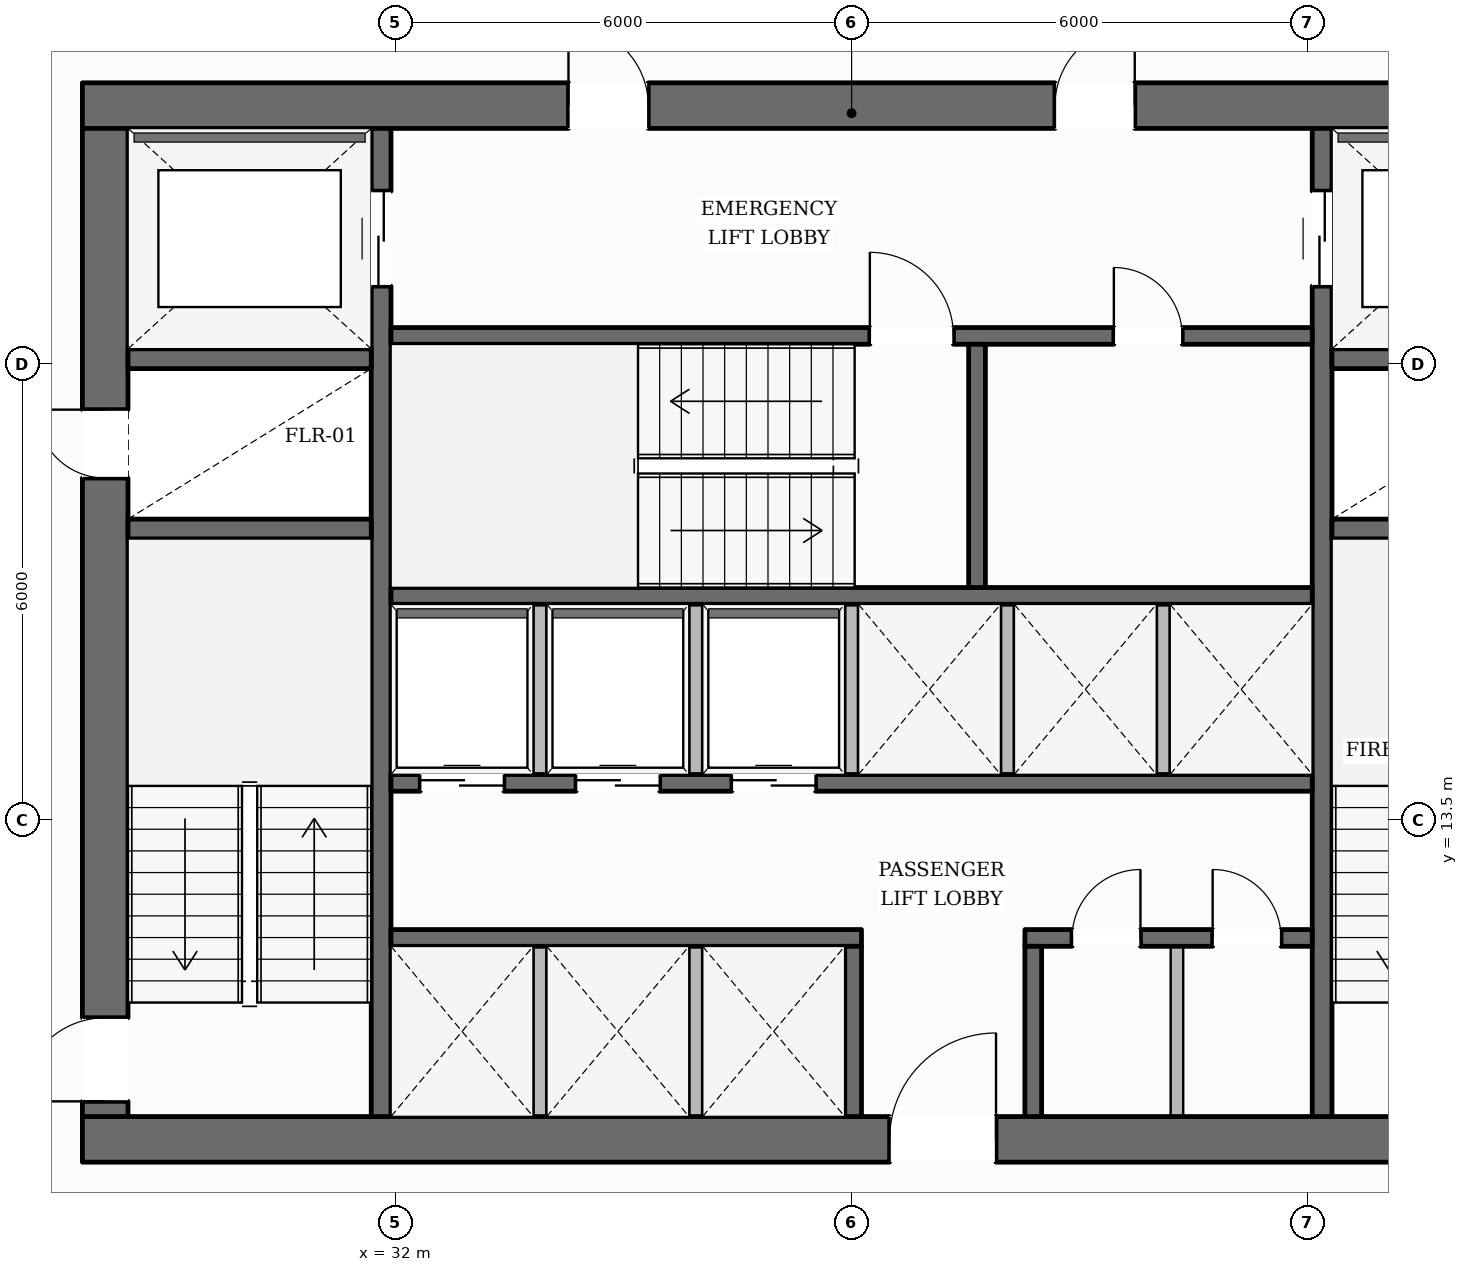
"""IFC4 building model, lengths in metres.
Left out: names, types, materials, properties, quantities, classifications, styles, units other than length and angle.
Written with IfcOpenShell. Run it as: python <this file> out.ifc"""

import sys

from ifc_helpers import new_model, si_unit, direction, frame, frame_2d, origin, place, context, subcontext, project, spatial, rectangle, extrude, element, fill, save


model = new_model("IFC4")
c1 = context("Model", 3, precision=1e-05, world=origin(), true_north=direction((0.0, 1.0)))
c2 = subcontext(c1, "Body", "Model", "MODEL_VIEW")
j1 = project(units=[si_unit("LENGTHUNIT", "METRE"), si_unit("PLANEANGLEUNIT", "RADIAN")], contexts=[c1])
p1 = place(None, origin())
s1 = spatial("IfcSite", under=j1, at=p1, CompositionType="ELEMENT")
p2 = place(p1, origin())
s2 = spatial("IfcBuilding", under=s1, at=p2, CompositionType="ELEMENT")
p3 = place(p2, frame((0.0, 0.0, 59.9)))
s3 = spatial("IfcBuildingStorey", under=s2, at=p3, CompositionType="ELEMENT", Elevation=59.9)
p4 = place(p3, frame((27.88, 9.3, 0.0), z_axis=(0.0, 0.0, 1.0), x_axis=(1.0, 0.0, 0.0)))
e1 = element("IfcWall", 1, at=p4, inside=s3, PredefinedType="SOLIDWALL", context=c2, shape_type="SweptSolid", body=[
    extrude(rectangle(XDim=20.24, YDim=0.6, at=frame_2d((10.12, 0.0))), origin(), (0.0, 0.0, 1.0), 3.59),
])
p5 = place(p4, frame((10.62, 0.0, 0.0)))
e2 = element("IfcOpeningElement", 2, at=p5, cuts=e1, PredefinedType="OPENING", context=c2, shape_type="SweptSolid", body=[
    extrude(rectangle(XDim=1.4, YDim=2.2, at=frame_2d((0.7, 1.1))), frame((0.0, 0.31, 0.0), z_axis=(0.0, -1.0, 0.0), x_axis=(1.0, 0.0, 0.0)), (0.0, 0.0, 1.0), 0.62),
])
p6 = place(p3, frame((27.88, 22.9, 0.0), z_axis=(0.0, 0.0, 1.0), x_axis=(1.0, 0.0, 0.0)))
e3 = element("IfcWall", 3, at=p6, inside=s3, PredefinedType="SOLIDWALL", context=c2, shape_type="SweptSolid", body=[
    extrude(rectangle(XDim=20.24, YDim=0.6, at=frame_2d((10.12, 0.0))), origin(), (0.0, 0.0, 1.0), 3.59),
])
p7 = place(p6, frame((6.395, 0.0, 0.0)))
e4 = element("IfcOpeningElement", 4, at=p7, cuts=e3, PredefinedType="OPENING", context=c2, shape_type="SweptSolid", body=[
    extrude(rectangle(XDim=1.05, YDim=2.15, at=frame_2d((0.525, 1.075))), frame((0.0, 0.31, 0.0), z_axis=(0.0, -1.0, 0.0), x_axis=(1.0, 0.0, 0.0)), (0.0, 0.0, 1.0), 0.62),
])
p8 = place(p6, frame((12.795, 0.0, 0.0)))
e5 = element("IfcOpeningElement", 5, at=p8, cuts=e3, PredefinedType="OPENING", context=c2, shape_type="SweptSolid", body=[
    extrude(rectangle(XDim=1.05, YDim=2.15, at=frame_2d((0.525, 1.075))), frame((0.0, 0.31, 0.0), z_axis=(0.0, -1.0, 0.0), x_axis=(1.0, 0.0, 0.0)), (0.0, 0.0, 1.0), 0.62),
])
p9 = place(p3, frame((28.18, 9.6, 0.0), z_axis=(0.0, 0.0, 1.0), x_axis=(0.0, 1.0, 0.0)))
e6 = element("IfcWall", 6, at=p9, inside=s3, PredefinedType="SOLIDWALL", context=c2, shape_type="SweptSolid", body=[
    extrude(rectangle(XDim=13.0, YDim=0.6, at=frame_2d((6.5, 0.0))), origin(), (0.0, 0.0, 1.0), 3.59),
])
p10 = place(p9, frame((0.2, 0.0, 0.0)))
e7 = element("IfcOpeningElement", 7, at=p10, cuts=e6, PredefinedType="OPENING", context=c2, shape_type="SweptSolid", body=[
    extrude(rectangle(XDim=1.1, YDim=2.15, at=frame_2d((0.55, 1.075))), frame((0.0, 0.31, 0.0), z_axis=(0.0, -1.0, 0.0), x_axis=(1.0, 0.0, 0.0)), (0.0, 0.0, 1.0), 0.62),
])
p11 = place(p9, frame((8.4, 0.0, 0.0)))
e8 = element("IfcOpeningElement", 8, at=p11, cuts=e6, PredefinedType="OPENING", context=c2, shape_type="SweptSolid", body=[
    extrude(rectangle(XDim=0.9, YDim=2.1, at=frame_2d((0.45, 1.05))), frame((0.0, 0.31, 0.0), z_axis=(0.0, -1.0, 0.0), x_axis=(1.0, 0.0, 0.0)), (0.0, 0.0, 1.0), 0.62),
])
p12 = place(p3, frame((31.81, 9.6, 0.0), z_axis=(0.0, 0.0, 1.0), x_axis=(0.0, 1.0, 0.0)))
e9 = element("IfcWall", 9, at=p12, inside=s3, PredefinedType="SHEAR", context=c2, shape_type="SweptSolid", body=[
    extrude(rectangle(XDim=13.0, YDim=0.26, at=frame_2d((6.5, 0.0))), origin(), (0.0, 0.0, 1.0), 3.59),
])
p13 = place(p12, frame((10.925, 0.0, 0.0)))
e10 = element("IfcOpeningElement", 10, at=p13, cuts=e9, PredefinedType="OPENING", context=c2, shape_type="SweptSolid", body=[
    extrude(rectangle(XDim=1.25, YDim=2.25, at=frame_2d((0.625, 1.125))), frame((0.0, 0.14, 0.0), z_axis=(0.0, -1.0, 0.0), x_axis=(1.0, 0.0, 0.0)), (0.0, 0.0, 1.0), 0.28),
])
p14 = place(p3, frame((44.19, 9.6, 0.0), z_axis=(0.0, 0.0, 1.0), x_axis=(0.0, 1.0, 0.0)))
e11 = element("IfcWall", 11, at=p14, inside=s3, PredefinedType="SHEAR", context=c2, shape_type="SweptSolid", body=[
    extrude(rectangle(XDim=13.0, YDim=0.26, at=frame_2d((6.5, 0.0))), origin(), (0.0, 0.0, 1.0), 3.59),
])
p15 = place(p14, frame((10.925, 0.0, 0.0)))
e12 = element("IfcOpeningElement", 12, at=p15, cuts=e11, PredefinedType="OPENING", context=c2, shape_type="SweptSolid", body=[
    extrude(rectangle(XDim=1.25, YDim=2.25, at=frame_2d((0.625, 1.125))), frame((0.0, 0.14, 0.0), z_axis=(0.0, -1.0, 0.0), x_axis=(1.0, 0.0, 0.0)), (0.0, 0.0, 1.0), 0.28),
])
for number, where, z_axis, x_axis in (
    (13, (28.48, 17.33, 0.0), (0.0, 0.0, 1.0), (1.0, 0.0, 0.0)),
    (14, (28.48, 19.57, 0.0), (0.0, 0.0, 1.0), (1.0, 0.0, 0.0)),
    (15, (44.32, 17.33, 0.0), (0.0, 0.0, 1.0), (1.0, 0.0, 0.0)),
    (16, (44.32, 19.57, 0.0), (0.0, 0.0, 1.0), (1.0, 0.0, 0.0)),
):
    element("IfcWall", number, at=place(p3, frame(where, z_axis=z_axis, x_axis=x_axis)), inside=s3, PredefinedType="SHEAR", context=c2, shape_type="SweptSolid", body=[
        extrude(rectangle(XDim=3.2, YDim=0.26, at=frame_2d((1.6, 0.0))), origin(), (0.0, 0.0, 1.0), 3.59),
    ])
p16 = place(p3, frame((31.94, 19.87, 0.0), z_axis=(0.0, 0.0, 1.0), x_axis=(1.0, 0.0, 0.0)))
e17 = element("IfcWall", 17, at=p16, inside=s3, PredefinedType="SOLIDWALL", context=c2, shape_type="SweptSolid", body=[
    extrude(rectangle(XDim=12.12, YDim=0.22, at=frame_2d((6.06, 0.0))), origin(), (0.0, 0.0, 1.0), 3.59),
])
p17 = place(p16, frame((6.3, 0.0, 0.0)))
e18 = element("IfcOpeningElement", 18, at=p17, cuts=e17, PredefinedType="OPENING", context=c2, shape_type="SweptSolid", body=[
    extrude(rectangle(XDim=1.1, YDim=2.15, at=frame_2d((0.55, 1.075))), frame((0.0, 0.12, 0.0), z_axis=(0.0, -1.0, 0.0), x_axis=(1.0, 0.0, 0.0)), (0.0, 0.0, 1.0), 0.24),
])
p18 = place(p16, frame((9.51, 0.0, 0.0)))
e19 = element("IfcOpeningElement", 19, at=p18, cuts=e17, PredefinedType="OPENING", context=c2, shape_type="SweptSolid", body=[
    extrude(rectangle(XDim=0.9, YDim=2.1, at=frame_2d((0.45, 1.05))), frame((0.0, 0.12, 0.0), z_axis=(0.0, -1.0, 0.0), x_axis=(1.0, 0.0, 0.0)), (0.0, 0.0, 1.0), 0.24),
])
p19 = place(p3, frame((31.94, 16.45, 0.0), z_axis=(0.0, 0.0, 1.0), x_axis=(1.0, 0.0, 0.0)))
e20 = element("IfcWall", 20, at=p19, inside=s3, PredefinedType="SOLIDWALL", context=c2, shape_type="SweptSolid", body=[
    extrude(rectangle(XDim=12.12, YDim=0.22, at=frame_2d((6.06, 0.0))), origin(), (0.0, 0.0, 1.0), 3.59),
])
p20 = place(p3, frame((39.65, 16.56, 0.0), z_axis=(0.0, 0.0, 1.0), x_axis=(0.0, 1.0, 0.0)))
e21 = element("IfcWall", 21, at=p20, inside=s3, PredefinedType="SOLIDWALL", context=c2, shape_type="SweptSolid", body=[
    extrude(rectangle(XDim=3.2, YDim=0.22, at=frame_2d((1.6, 0.0))), origin(), (0.0, 0.0, 1.0), 3.59),
])
p21 = place(p3, frame((31.94, 13.99, 0.0), z_axis=(0.0, 0.0, 1.0), x_axis=(1.0, 0.0, 0.0)))
e22 = element("IfcWall", 22, at=p21, inside=s3, PredefinedType="SOLIDWALL", context=c2, shape_type="SweptSolid", body=[
    extrude(rectangle(XDim=12.12, YDim=0.22, at=frame_2d((6.06, 0.0))), origin(), (0.0, 0.0, 1.0), 3.59),
])
p22 = place(p21, frame((0.385, 0.0, 0.0)))
e23 = element("IfcOpeningElement", 23, at=p22, cuts=e22, PredefinedType="OPENING", context=c2, shape_type="SweptSolid", body=[
    extrude(rectangle(XDim=1.1, YDim=2.2, at=frame_2d((0.55, 1.1))), frame((0.0, 0.12, 0.0), z_axis=(0.0, -1.0, 0.0), x_axis=(1.0, 0.0, 0.0)), (0.0, 0.0, 1.0), 0.24),
])
p23 = place(p21, frame((2.435, 0.0, 0.0)))
e24 = element("IfcOpeningElement", 24, at=p23, cuts=e22, PredefinedType="OPENING", context=c2, shape_type="SweptSolid", body=[
    extrude(rectangle(XDim=1.1, YDim=2.2, at=frame_2d((0.55, 1.1))), frame((0.0, 0.12, 0.0), z_axis=(0.0, -1.0, 0.0), x_axis=(1.0, 0.0, 0.0)), (0.0, 0.0, 1.0), 0.24),
])
p24 = place(p21, frame((4.485, 0.0, 0.0)))
e25 = element("IfcOpeningElement", 25, at=p24, cuts=e22, PredefinedType="OPENING", context=c2, shape_type="SweptSolid", body=[
    extrude(rectangle(XDim=1.1, YDim=2.2, at=frame_2d((0.55, 1.1))), frame((0.0, 0.12, 0.0), z_axis=(0.0, -1.0, 0.0), x_axis=(1.0, 0.0, 0.0)), (0.0, 0.0, 1.0), 0.24),
])
p25 = place(p3, frame((31.94, 11.95, 0.0), z_axis=(0.0, 0.0, 1.0), x_axis=(1.0, 0.0, 0.0)))
e26 = element("IfcWall", 26, at=p25, inside=s3, PredefinedType="SOLIDWALL", context=c2, shape_type="SweptSolid", body=[
    extrude(rectangle(XDim=6.19, YDim=0.22, at=frame_2d((3.095, 0.0))), origin(), (0.0, 0.0, 1.0), 3.59),
])
p26 = place(p3, frame((40.28, 11.95, 0.0), z_axis=(0.0, 0.0, 1.0), x_axis=(1.0, 0.0, 0.0)))
e27 = element("IfcWall", 27, at=p26, inside=s3, PredefinedType="SOLIDWALL", context=c2, shape_type="SweptSolid", body=[
    extrude(rectangle(XDim=3.78, YDim=0.22, at=frame_2d((1.89, 0.0))), origin(), (0.0, 0.0, 1.0), 3.59),
])
p27 = place(p26, frame((0.62, 0.0, 0.0)))
e28 = element("IfcOpeningElement", 28, at=p27, cuts=e27, PredefinedType="OPENING", context=c2, shape_type="SweptSolid", body=[
    extrude(rectangle(XDim=0.9, YDim=2.1, at=frame_2d((0.45, 1.05))), frame((0.0, 0.12, 0.0), z_axis=(0.0, -1.0, 0.0), x_axis=(1.0, 0.0, 0.0)), (0.0, 0.0, 1.0), 0.24),
])
p28 = place(p26, frame((2.47, 0.0, 0.0)))
e29 = element("IfcOpeningElement", 29, at=p28, cuts=e27, PredefinedType="OPENING", context=c2, shape_type="SweptSolid", body=[
    extrude(rectangle(XDim=0.9, YDim=2.1, at=frame_2d((0.45, 1.05))), frame((0.0, 0.12, 0.0), z_axis=(0.0, -1.0, 0.0), x_axis=(1.0, 0.0, 0.0)), (0.0, 0.0, 1.0), 0.24),
])
for number, where, z_axis, x_axis in (
    (30, (38.02, 9.6, 0.0), (0.0, 0.0, 1.0), (0.0, 1.0, 0.0)),
    (31, (40.39, 9.6, 0.0), (0.0, 0.0, 1.0), (0.0, 1.0, 0.0)),
):
    element("IfcWall", number, at=place(p3, frame(where, z_axis=z_axis, x_axis=x_axis)), inside=s3, PredefinedType="SOLIDWALL", context=c2, shape_type="SweptSolid", body=[
        extrude(rectangle(XDim=2.24, YDim=0.22, at=frame_2d((1.12, 0.0))), origin(), (0.0, 0.0, 1.0), 3.59),
    ])
p29 = place(p3, frame((12.724, 13.636, 0.0), z_axis=(0.0, 0.0, 1.0), x_axis=(0.504702471056, 0.863293354376, 0.0)))
e32 = element("IfcWall", 32, at=p29, inside=s3, PredefinedType="STANDARD", context=c2, shape_type="SweptSolid", body=[
    extrude(rectangle(XDim=35.682, YDim=0.38, at=frame_2d((17.841, 0.0))), origin(), (0.0, 0.0, 1.0), 2.97),
])
p30 = place(p29, frame((31.488, 0.0, 0.65)))
e33 = element("IfcOpeningElement", 33, at=p30, cuts=e32, PredefinedType="OPENING", context=c2, shape_type="SweptSolid", body=[
    extrude(rectangle(XDim=1.65, YDim=1.75, at=frame_2d((0.825, 0.875))), frame((0.0, 0.2, 0.0), z_axis=(0.0, -1.0, 0.0), x_axis=(1.0, 0.0, 0.0)), (0.0, 0.0, 1.0), 0.4),
])
p31 = place(p29, frame((25.701, 0.0, 0.65)))
e34 = element("IfcOpeningElement", 34, at=p31, cuts=e32, PredefinedType="OPENING", context=c2, shape_type="SweptSolid", body=[
    extrude(rectangle(XDim=1.65, YDim=1.75, at=frame_2d((0.825, 0.875))), frame((0.0, 0.2, 0.0), z_axis=(0.0, -1.0, 0.0), x_axis=(1.0, 0.0, 0.0)), (0.0, 0.0, 1.0), 0.4),
])
p32 = place(p29, frame((14.125, 0.0, 0.65)))
e35 = element("IfcOpeningElement", 35, at=p32, cuts=e32, PredefinedType="OPENING", context=c2, shape_type="SweptSolid", body=[
    extrude(rectangle(XDim=1.65, YDim=1.75, at=frame_2d((0.825, 0.875))), frame((0.0, 0.2, 0.0), z_axis=(0.0, -1.0, 0.0), x_axis=(1.0, 0.0, 0.0)), (0.0, 0.0, 1.0), 0.4),
])
p33 = place(p29, frame((8.337, 0.0, 0.65)))
e36 = element("IfcOpeningElement", 36, at=p33, cuts=e32, PredefinedType="OPENING", context=c2, shape_type="SweptSolid", body=[
    extrude(rectangle(XDim=1.65, YDim=1.75, at=frame_2d((0.825, 0.875))), frame((0.0, 0.2, 0.0), z_axis=(0.0, -1.0, 0.0), x_axis=(1.0, 0.0, 0.0)), (0.0, 0.0, 1.0), 0.4),
])
p34 = place(p29, frame((2.549, 0.0, 0.65)))
e37 = element("IfcOpeningElement", 37, at=p34, cuts=e32, PredefinedType="OPENING", context=c2, shape_type="SweptSolid", body=[
    extrude(rectangle(XDim=1.65, YDim=1.75, at=frame_2d((0.825, 0.875))), frame((0.0, 0.2, 0.0), z_axis=(0.0, -1.0, 0.0), x_axis=(1.0, 0.0, 0.0)), (0.0, 0.0, 1.0), 0.4),
])
for number, where, z_axis, x_axis in (
    (38, (33.9, 9.6, 0.0), (0.0, 0.0, 1.0), (0.0, 1.0, 0.0)),
    (39, (35.95, 9.6, 0.0), (0.0, 0.0, 1.0), (0.0, 1.0, 0.0)),
    (40, (33.9, 14.1, 0.0), (0.0, 0.0, 1.0), (0.0, 1.0, 0.0)),
    (41, (35.95, 14.1, 0.0), (0.0, 0.0, 1.0), (0.0, 1.0, 0.0)),
    (42, (38.0, 14.1, 0.0), (0.0, 0.0, 1.0), (0.0, 1.0, 0.0)),
    (43, (40.05, 14.1, 0.0), (0.0, 0.0, 1.0), (0.0, 1.0, 0.0)),
    (44, (42.1, 14.1, 0.0), (0.0, 0.0, 1.0), (0.0, 1.0, 0.0)),
    (45, (42.28, 9.6, 0.0), (0.0, 0.0, 1.0), (0.0, 1.0, 0.0)),
):
    element("IfcWall", number, at=place(p3, frame(where, z_axis=z_axis, x_axis=x_axis)), inside=s3, PredefinedType="PARTITIONING", context=c2, shape_type="SweptSolid", body=[
        extrude(rectangle(XDim=2.24, YDim=0.165, at=frame_2d((1.12, 0.0))), origin(), (0.0, 0.0, 1.0), 3.59),
    ])
p35 = place(p10, origin())
e46 = element("IfcDoor", 46, at=p35, inside=s3, OperationType="SINGLE_SWING_LEFT", PredefinedType="DOOR", context=c2, shape_type="SweptSolid", body=[
    extrude(rectangle(XDim=1.1, YDim=2.15, at=frame_2d((0.55, 1.075))), frame((0.0, 0.025, 0.0), z_axis=(0.0, -1.0, 0.0), x_axis=(1.0, 0.0, 0.0)), (0.0, 0.0, 1.0), 0.05),
])
fill(e7, e46)
p36 = place(p17, origin())
e47 = element("IfcDoor", 47, at=p36, inside=s3, OperationType="SINGLE_SWING_LEFT", PredefinedType="DOOR", context=c2, shape_type="SweptSolid", body=[
    extrude(rectangle(XDim=1.1, YDim=2.15, at=frame_2d((0.55, 1.075))), frame((0.0, 0.025, 0.0), z_axis=(0.0, -1.0, 0.0), x_axis=(1.0, 0.0, 0.0)), (0.0, 0.0, 1.0), 0.05),
])
fill(e18, e47)
p37 = place(p11, origin())
e48 = element("IfcDoor", 48, at=p37, inside=s3, OperationType="SINGLE_SWING_RIGHT", PredefinedType="DOOR", context=c2, shape_type="SweptSolid", body=[
    extrude(rectangle(XDim=0.9, YDim=2.1, at=frame_2d((0.45, 1.05))), frame((0.0, 0.025, 0.0), z_axis=(0.0, -1.0, 0.0), x_axis=(1.0, 0.0, 0.0)), (0.0, 0.0, 1.0), 0.05),
])
fill(e8, e48)
p38 = place(p7, origin())
e49 = element("IfcDoor", 49, at=p38, inside=s3, OperationType="SINGLE_SWING_LEFT", PredefinedType="DOOR", context=c2, shape_type="SweptSolid", body=[
    extrude(rectangle(XDim=1.05, YDim=2.15, at=frame_2d((0.525, 1.075))), frame((0.0, 0.025, 0.0), z_axis=(0.0, -1.0, 0.0), x_axis=(1.0, 0.0, 0.0)), (0.0, 0.0, 1.0), 0.05),
])
fill(e4, e49)
p39 = place(p8, origin())
e50 = element("IfcDoor", 50, at=p39, inside=s3, OperationType="SINGLE_SWING_RIGHT", PredefinedType="DOOR", context=c2, shape_type="SweptSolid", body=[
    extrude(rectangle(XDim=1.05, YDim=2.15, at=frame_2d((0.525, 1.075))), frame((0.0, 0.025, 0.0), z_axis=(0.0, -1.0, 0.0), x_axis=(1.0, 0.0, 0.0)), (0.0, 0.0, 1.0), 0.05),
])
fill(e5, e50)
p40 = place(p13, origin())
e51 = element("IfcDoor", 51, at=p40, inside=s3, OperationType="DOUBLE_DOOR_SLIDING", PredefinedType="DOOR", context=c2, shape_type="SweptSolid", body=[
    extrude(rectangle(XDim=1.25, YDim=2.25, at=frame_2d((0.625, 1.125))), frame((0.0, 0.025, 0.0), z_axis=(0.0, -1.0, 0.0), x_axis=(1.0, 0.0, 0.0)), (0.0, 0.0, 1.0), 0.05),
])
fill(e10, e51)
p41 = place(p15, origin())
e52 = element("IfcDoor", 52, at=p41, inside=s3, OperationType="DOUBLE_DOOR_SLIDING", PredefinedType="DOOR", context=c2, shape_type="SweptSolid", body=[
    extrude(rectangle(XDim=1.25, YDim=2.25, at=frame_2d((0.625, 1.125))), frame((0.0, 0.025, 0.0), z_axis=(0.0, -1.0, 0.0), x_axis=(1.0, 0.0, 0.0)), (0.0, 0.0, 1.0), 0.05),
])
fill(e12, e52)
p42 = place(p5, origin())
e53 = element("IfcDoor", 53, at=p42, inside=s3, OperationType="SINGLE_SWING_RIGHT", PredefinedType="DOOR", context=c2, shape_type="SweptSolid", body=[
    extrude(rectangle(XDim=1.4, YDim=2.2, at=frame_2d((0.7, 1.1))), frame((0.0, 0.025, 0.0), z_axis=(0.0, -1.0, 0.0), x_axis=(1.0, 0.0, 0.0)), (0.0, 0.0, 1.0), 0.05),
])
fill(e2, e53)
p43 = place(p22, origin())
e54 = element("IfcDoor", 54, at=p43, inside=s3, OperationType="DOUBLE_DOOR_SLIDING", PredefinedType="DOOR", context=c2, shape_type="SweptSolid", body=[
    extrude(rectangle(XDim=1.1, YDim=2.2, at=frame_2d((0.55, 1.1))), frame((0.0, 0.025, 0.0), z_axis=(0.0, -1.0, 0.0), x_axis=(1.0, 0.0, 0.0)), (0.0, 0.0, 1.0), 0.05),
])
fill(e23, e54)
p44 = place(p23, origin())
e55 = element("IfcDoor", 55, at=p44, inside=s3, OperationType="DOUBLE_DOOR_SLIDING", PredefinedType="DOOR", context=c2, shape_type="SweptSolid", body=[
    extrude(rectangle(XDim=1.1, YDim=2.2, at=frame_2d((0.55, 1.1))), frame((0.0, 0.025, 0.0), z_axis=(0.0, -1.0, 0.0), x_axis=(1.0, 0.0, 0.0)), (0.0, 0.0, 1.0), 0.05),
])
fill(e24, e55)
p45 = place(p24, origin())
e56 = element("IfcDoor", 56, at=p45, inside=s3, OperationType="DOUBLE_DOOR_SLIDING", PredefinedType="DOOR", context=c2, shape_type="SweptSolid", body=[
    extrude(rectangle(XDim=1.1, YDim=2.2, at=frame_2d((0.55, 1.1))), frame((0.0, 0.025, 0.0), z_axis=(0.0, -1.0, 0.0), x_axis=(1.0, 0.0, 0.0)), (0.0, 0.0, 1.0), 0.05),
])
fill(e25, e56)
p46 = place(p18, origin())
e57 = element("IfcDoor", 57, at=p46, inside=s3, OperationType="SINGLE_SWING_LEFT", PredefinedType="DOOR", context=c2, shape_type="SweptSolid", body=[
    extrude(rectangle(XDim=0.9, YDim=2.1, at=frame_2d((0.45, 1.05))), frame((0.0, 0.025, 0.0), z_axis=(0.0, -1.0, 0.0), x_axis=(1.0, 0.0, 0.0)), (0.0, 0.0, 1.0), 0.05),
])
fill(e19, e57)
p47 = place(p27, origin())
e58 = element("IfcDoor", 58, at=p47, inside=s3, OperationType="SINGLE_SWING_RIGHT", PredefinedType="DOOR", context=c2, shape_type="SweptSolid", body=[
    extrude(rectangle(XDim=0.9, YDim=2.1, at=frame_2d((0.45, 1.05))), frame((0.0, 0.025, 0.0), z_axis=(0.0, -1.0, 0.0), x_axis=(1.0, 0.0, 0.0)), (0.0, 0.0, 1.0), 0.05),
])
fill(e28, e58)
p48 = place(p28, origin())
e59 = element("IfcDoor", 59, at=p48, inside=s3, OperationType="SINGLE_SWING_LEFT", PredefinedType="DOOR", context=c2, shape_type="SweptSolid", body=[
    extrude(rectangle(XDim=0.9, YDim=2.1, at=frame_2d((0.45, 1.05))), frame((0.0, 0.025, 0.0), z_axis=(0.0, -1.0, 0.0), x_axis=(1.0, 0.0, 0.0)), (0.0, 0.0, 1.0), 0.05),
])
fill(e29, e59)
save(model, sys.argv[1])
